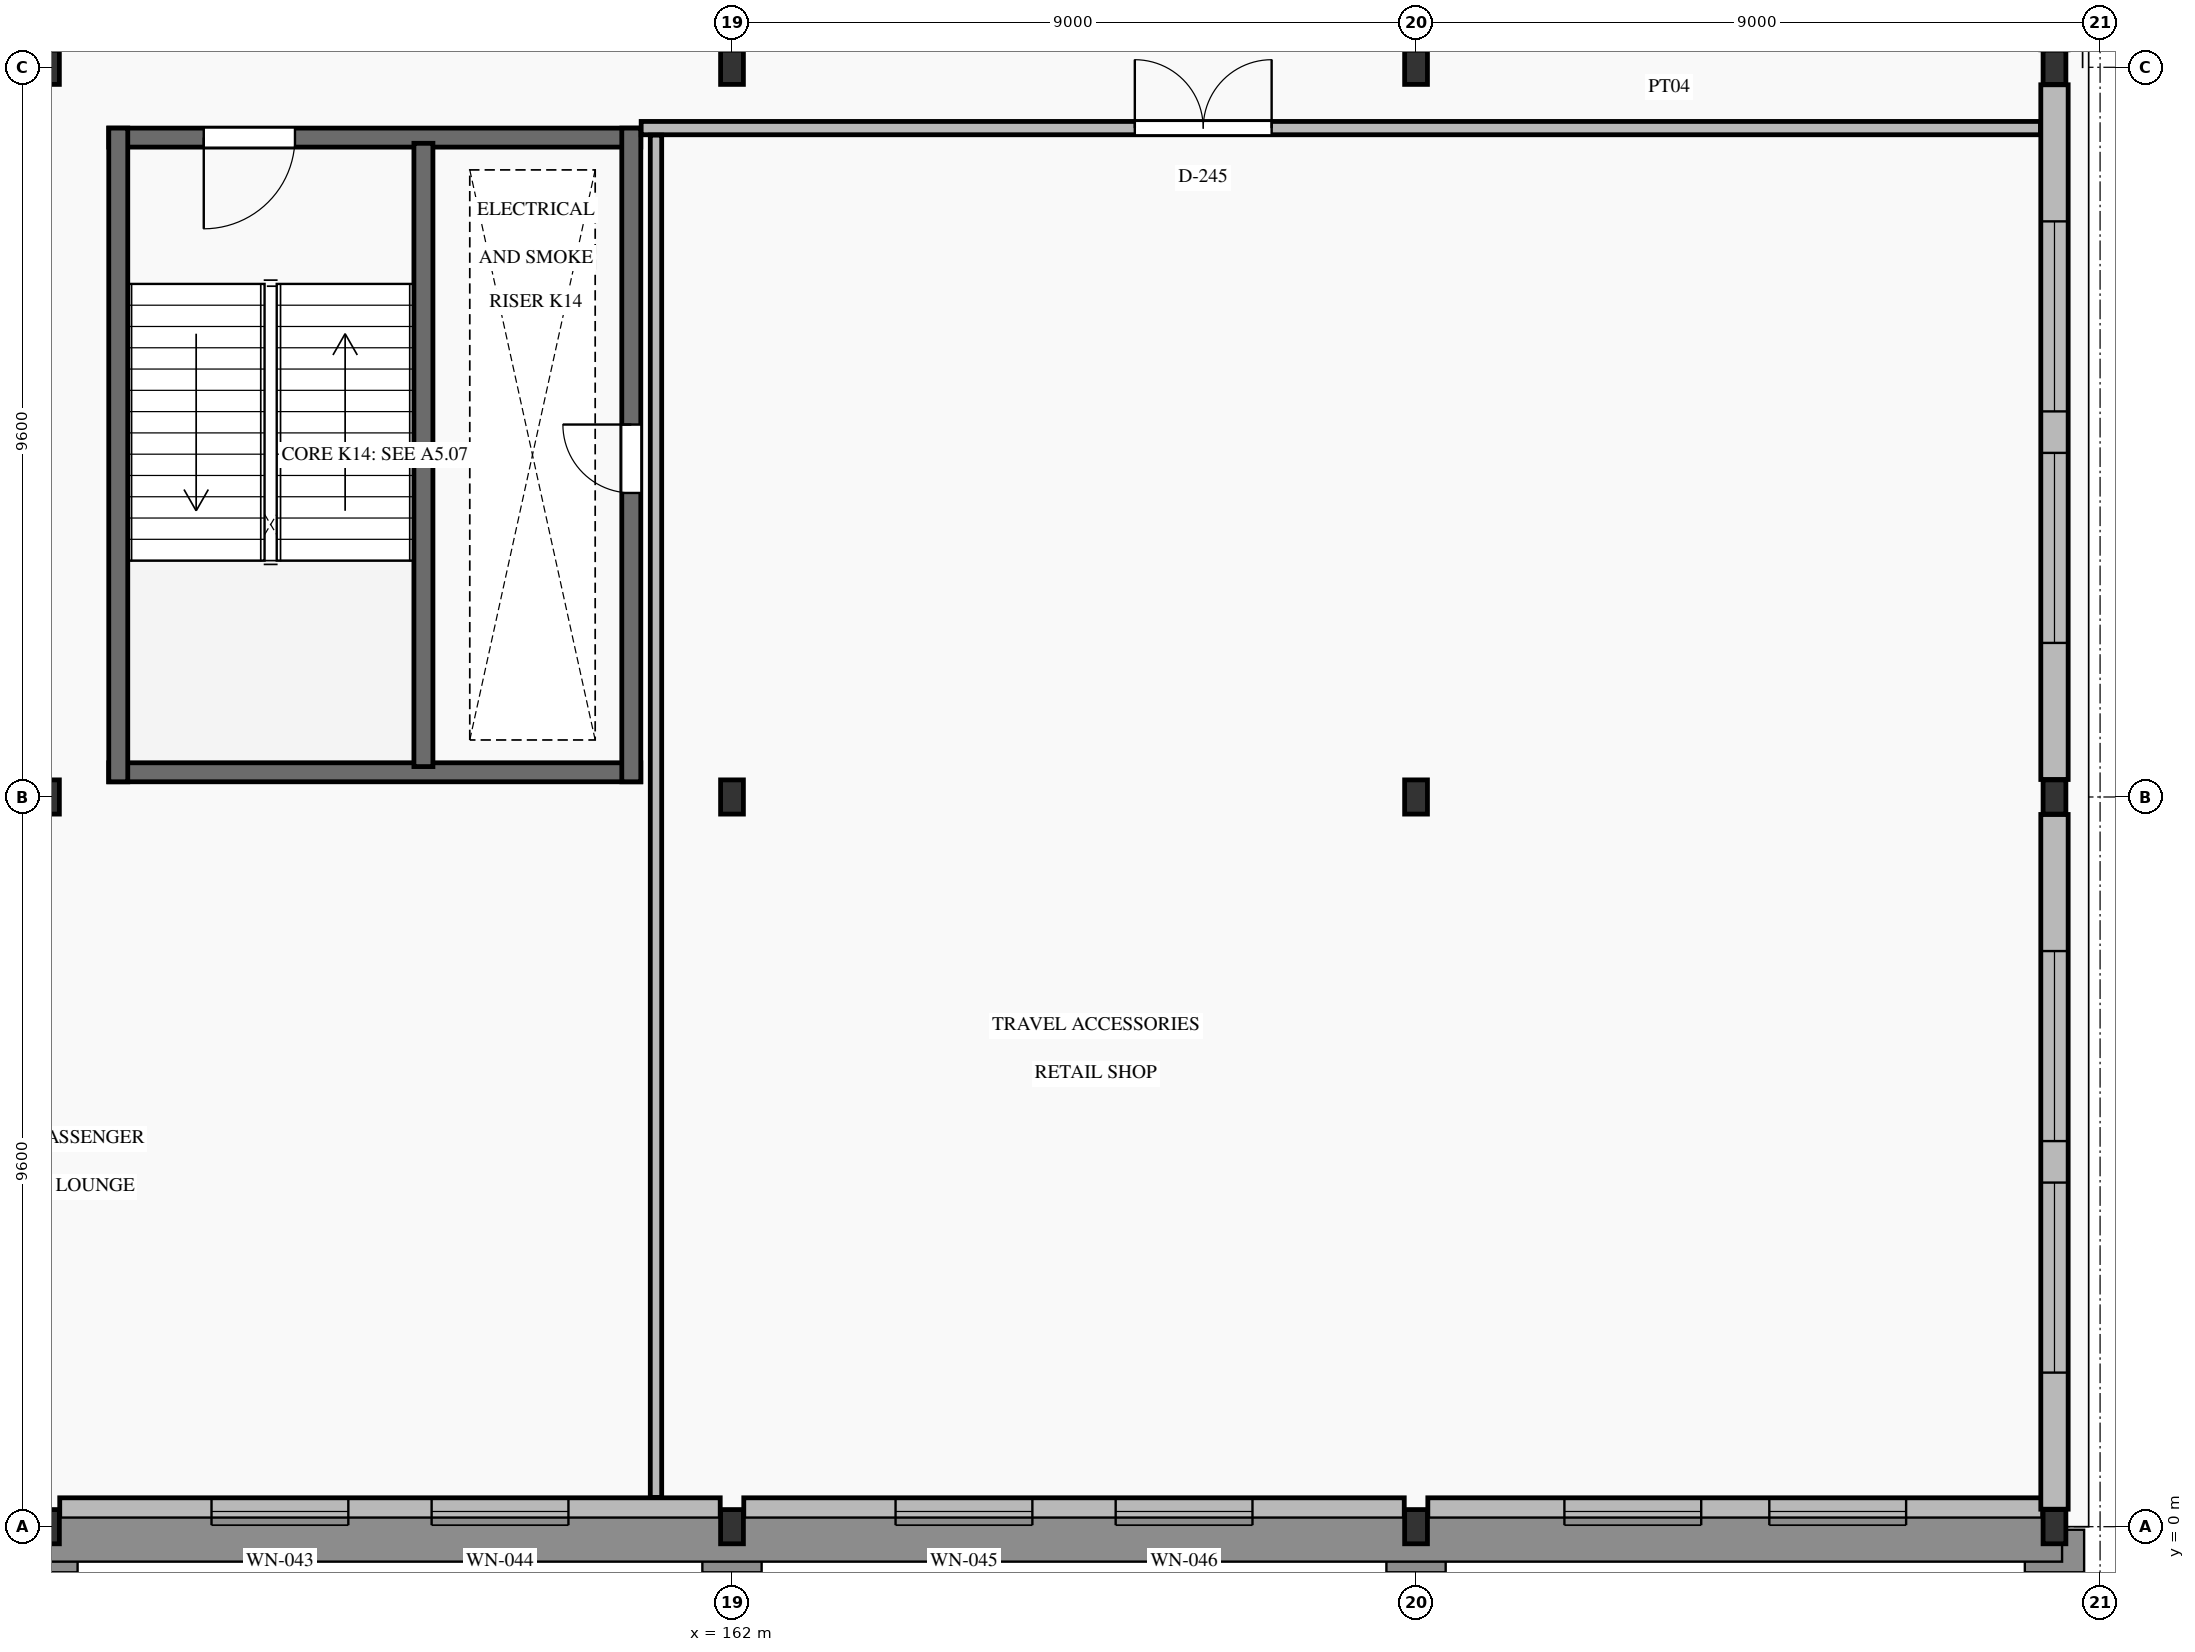
"""IFC4 building model, lengths in metres.
Left out: names, types, materials, properties, quantities, classifications, styles, units other than length and angle.
Written with IfcOpenShell. Run it as: python <this file> out.ifc"""

import sys

from ifc_helpers import new_model, si_unit, direction, frame, frame_2d, origin, origin_2d, place, context, subcontext, project, spatial, rectangle, i_section, extrude, element, fill, save


model = new_model("IFC4")
c1 = context("Model", 3, precision=1e-05, world=origin(), true_north=direction((0.0, 1.0)))
c2 = subcontext(c1, "Body", "Model", "MODEL_VIEW")
j1 = project(units=[si_unit("LENGTHUNIT", "METRE"), si_unit("PLANEANGLEUNIT", "RADIAN")], contexts=[c1])
p1 = place(None, origin())
s1 = spatial("IfcSite", under=j1, at=p1, CompositionType="ELEMENT")
p2 = place(p1, origin())
s2 = spatial("IfcBuilding", under=s1, at=p2, CompositionType="ELEMENT")
p3 = place(p2, frame((0.0, 0.0, 6.0)))
s3 = spatial("IfcBuildingStorey", under=s2, at=p3, CompositionType="ELEMENT", Elevation=6.0)
for number, where, z_axis, x_axis in (
    (1, (153.0, 0.0, 0.0), (0.0, 0.0, 1.0), (1.0, 0.0, 0.0)),
    (2, (153.0, 9.6, 0.0), (0.0, 0.0, 1.0), (1.0, 0.0, 0.0)),
    (3, (153.0, 19.2, 0.0), (0.0, 0.0, 1.0), (1.0, 0.0, 0.0)),
    (4, (162.0, 0.0, 0.0), (0.0, 0.0, 1.0), (1.0, 0.0, 0.0)),
    (5, (162.0, 9.6, 0.0), (0.0, 0.0, 1.0), (1.0, 0.0, 0.0)),
    (6, (162.0, 19.2, 0.0), (0.0, 0.0, 1.0), (1.0, 0.0, 0.0)),
    (7, (171.0, 0.0, 0.0), (0.0, 0.0, 1.0), (1.0, 0.0, 0.0)),
    (8, (171.0, 9.6, 0.0), (0.0, 0.0, 1.0), (1.0, 0.0, 0.0)),
    (9, (171.0, 19.2, 0.0), (0.0, 0.0, 1.0), (1.0, 0.0, 0.0)),
    (10, (179.4, 0.0, 0.0), (0.0, 0.0, 1.0), (1.0, 0.0, 0.0)),
    (11, (179.4, 9.6, 0.0), (0.0, 0.0, 1.0), (1.0, 0.0, 0.0)),
    (12, (179.4, 19.2, 0.0), (0.0, 0.0, 1.0), (1.0, 0.0, 0.0)),
):
    element("IfcColumn", number, at=place(p3, frame(where, z_axis=z_axis, x_axis=x_axis)), inside=s3, PredefinedType="COLUMN", context=c2, shape_type="SweptSolid", body=[
        extrude(i_section(OverallWidth=0.3, OverallDepth=0.45, WebThickness=0.014, FlangeThickness=0.026, FilletRadius=0.027, at=origin_2d()), origin(), (0.0, 0.0, 1.0), 4.8),
    ])
p4 = place(p3, frame((153.155, 0.2, 0.0), z_axis=(0.0, 0.0, 1.0), x_axis=(1.0, 0.0, 0.0)))
e13 = element("IfcWall", 13, at=p4, inside=s3, PredefinedType="SOLIDWALL", context=c2, shape_type="SweptSolid", body=[
    extrude(rectangle(XDim=8.69, YDim=0.36, at=frame_2d((4.345, 0.0))), origin(), (0.0, 0.0, 1.0), 4.23),
])
p5 = place(p4, frame((1.997, 0.0, 0.95)))
e14 = element("IfcOpeningElement", 14, at=p5, cuts=e13, PredefinedType="OPENING", context=c2, shape_type="SweptSolid", body=[
    extrude(rectangle(XDim=1.8, YDim=2.2, at=frame_2d((0.9, 1.1))), frame((0.0, 0.195, 0.0), z_axis=(0.0, -1.0, 0.0), x_axis=(1.0, 0.0, 0.0)), (0.0, 0.0, 1.0), 0.39),
])
p6 = place(p4, frame((4.893, 0.0, 0.95)))
e15 = element("IfcOpeningElement", 15, at=p6, cuts=e13, PredefinedType="OPENING", context=c2, shape_type="SweptSolid", body=[
    extrude(rectangle(XDim=1.8, YDim=2.2, at=frame_2d((0.9, 1.1))), frame((0.0, 0.195, 0.0), z_axis=(0.0, -1.0, 0.0), x_axis=(1.0, 0.0, 0.0)), (0.0, 0.0, 1.0), 0.39),
])
p7 = place(p3, frame((162.155, 0.2, 0.0), z_axis=(0.0, 0.0, 1.0), x_axis=(1.0, 0.0, 0.0)))
e16 = element("IfcWall", 16, at=p7, inside=s3, PredefinedType="SOLIDWALL", context=c2, shape_type="SweptSolid", body=[
    extrude(rectangle(XDim=8.69, YDim=0.36, at=frame_2d((4.345, 0.0))), origin(), (0.0, 0.0, 1.0), 4.215),
])
p8 = place(p7, frame((1.997, 0.0, 0.95)))
e17 = element("IfcOpeningElement", 17, at=p8, cuts=e16, PredefinedType="OPENING", context=c2, shape_type="SweptSolid", body=[
    extrude(rectangle(XDim=1.8, YDim=2.2, at=frame_2d((0.9, 1.1))), frame((0.0, 0.195, 0.0), z_axis=(0.0, -1.0, 0.0), x_axis=(1.0, 0.0, 0.0)), (0.0, 0.0, 1.0), 0.39),
])
p9 = place(p7, frame((4.893, 0.0, 0.95)))
e18 = element("IfcOpeningElement", 18, at=p9, cuts=e16, PredefinedType="OPENING", context=c2, shape_type="SweptSolid", body=[
    extrude(rectangle(XDim=1.8, YDim=2.2, at=frame_2d((0.9, 1.1))), frame((0.0, 0.195, 0.0), z_axis=(0.0, -1.0, 0.0), x_axis=(1.0, 0.0, 0.0)), (0.0, 0.0, 1.0), 0.39),
])
p10 = place(p3, frame((171.155, 0.2, 0.0), z_axis=(0.0, 0.0, 1.0), x_axis=(1.0, 0.0, 0.0)))
e19 = element("IfcWall", 19, at=p10, inside=s3, PredefinedType="SOLIDWALL", context=c2, shape_type="SweptSolid", body=[
    extrude(rectangle(XDim=8.09, YDim=0.36, at=frame_2d((4.045, 0.0))), origin(), (0.0, 0.0, 1.0), 4.215),
])
p11 = place(p10, frame((1.797, 0.0, 0.95)))
e20 = element("IfcOpeningElement", 20, at=p11, cuts=e19, PredefinedType="OPENING", context=c2, shape_type="SweptSolid", body=[
    extrude(rectangle(XDim=1.8, YDim=2.2, at=frame_2d((0.9, 1.1))), frame((0.0, 0.195, 0.0), z_axis=(0.0, -1.0, 0.0), x_axis=(1.0, 0.0, 0.0)), (0.0, 0.0, 1.0), 0.39),
])
p12 = place(p10, frame((4.493, 0.0, 0.95)))
e21 = element("IfcOpeningElement", 21, at=p12, cuts=e19, PredefinedType="OPENING", context=c2, shape_type="SweptSolid", body=[
    extrude(rectangle(XDim=1.8, YDim=2.2, at=frame_2d((0.9, 1.1))), frame((0.0, 0.195, 0.0), z_axis=(0.0, -1.0, 0.0), x_axis=(1.0, 0.0, 0.0)), (0.0, 0.0, 1.0), 0.39),
])
p13 = place(p3, frame((179.4, 0.23, 0.0), z_axis=(0.0, 0.0, 1.0), x_axis=(0.0, 1.0, 0.0)))
e22 = element("IfcWall", 22, at=p13, inside=s3, PredefinedType="SOLIDWALL", context=c2, shape_type="SweptSolid", body=[
    extrude(rectangle(XDim=9.14, YDim=0.36, at=frame_2d((4.57, 0.0))), origin(), (0.0, 0.0, 1.0), 4.185),
])
p14 = place(p13, frame((1.797, 0.0, 0.95)))
e23 = element("IfcOpeningElement", 23, at=p14, cuts=e22, PredefinedType="OPENING", context=c2, shape_type="SweptSolid", body=[
    extrude(rectangle(XDim=2.5, YDim=2.7, at=frame_2d((1.25, 1.35))), frame((0.0, 0.195, 0.0), z_axis=(0.0, -1.0, 0.0), x_axis=(1.0, 0.0, 0.0)), (0.0, 0.0, 1.0), 0.39),
])
p15 = place(p13, frame((4.843, 0.0, 0.95)))
e24 = element("IfcOpeningElement", 24, at=p15, cuts=e22, PredefinedType="OPENING", context=c2, shape_type="SweptSolid", body=[
    extrude(rectangle(XDim=2.5, YDim=2.7, at=frame_2d((1.25, 1.35))), frame((0.0, 0.195, 0.0), z_axis=(0.0, -1.0, 0.0), x_axis=(1.0, 0.0, 0.0)), (0.0, 0.0, 1.0), 0.39),
])
p16 = place(p3, frame((179.4, 9.83, 0.0), z_axis=(0.0, 0.0, 1.0), x_axis=(0.0, 1.0, 0.0)))
e25 = element("IfcWall", 25, at=p16, inside=s3, PredefinedType="SOLIDWALL", context=c2, shape_type="SweptSolid", body=[
    extrude(rectangle(XDim=9.14, YDim=0.36, at=frame_2d((4.57, 0.0))), origin(), (0.0, 0.0, 1.0), 4.185),
])
p17 = place(p16, frame((1.797, 0.0, 0.95)))
e26 = element("IfcOpeningElement", 26, at=p17, cuts=e25, PredefinedType="OPENING", context=c2, shape_type="SweptSolid", body=[
    extrude(rectangle(XDim=2.5, YDim=2.7, at=frame_2d((1.25, 1.35))), frame((0.0, 0.195, 0.0), z_axis=(0.0, -1.0, 0.0), x_axis=(1.0, 0.0, 0.0)), (0.0, 0.0, 1.0), 0.39),
])
p18 = place(p16, frame((4.843, 0.0, 0.95)))
e27 = element("IfcOpeningElement", 27, at=p18, cuts=e25, PredefinedType="OPENING", context=c2, shape_type="SweptSolid", body=[
    extrude(rectangle(XDim=2.5, YDim=2.7, at=frame_2d((1.25, 1.35))), frame((0.0, 0.195, 0.0), z_axis=(0.0, -1.0, 0.0), x_axis=(1.0, 0.0, 0.0)), (0.0, 0.0, 1.0), 0.39),
])
p19 = place(p3, frame((153.8, 9.925, 0.0), z_axis=(0.0, 0.0, 1.0), x_axis=(1.0, 0.0, 0.0)))
e28 = element("IfcWall", 28, at=p19, inside=s3, PredefinedType="SHEAR", context=c2, shape_type="SweptSolid", body=[
    extrude(rectangle(XDim=7.0, YDim=0.25, at=frame_2d((3.5, 0.0))), origin(), (0.0, 0.0, 1.0), 4.8),
])
p20 = place(p3, frame((153.8, 18.275, 0.0), z_axis=(0.0, 0.0, 1.0), x_axis=(1.0, 0.0, 0.0)))
e29 = element("IfcWall", 29, at=p20, inside=s3, PredefinedType="SHEAR", context=c2, shape_type="SweptSolid", body=[
    extrude(rectangle(XDim=7.0, YDim=0.25, at=frame_2d((3.5, 0.0))), origin(), (0.0, 0.0, 1.0), 4.8),
])
p21 = place(p20, frame((1.25, 0.0, 0.0)))
e30 = element("IfcOpeningElement", 30, at=p21, cuts=e29, PredefinedType="OPENING", context=c2, shape_type="SweptSolid", body=[
    extrude(rectangle(XDim=1.2, YDim=2.15, at=frame_2d((0.6, 1.075))), frame((0.0, 0.14, 0.0), z_axis=(0.0, -1.0, 0.0), x_axis=(1.0, 0.0, 0.0)), (0.0, 0.0, 1.0), 0.28),
])
p22 = place(p3, frame((153.925, 9.8, 0.0), z_axis=(0.0, 0.0, 1.0), x_axis=(0.0, 1.0, 0.0)))
e31 = element("IfcWall", 31, at=p22, inside=s3, PredefinedType="SHEAR", context=c2, shape_type="SweptSolid", body=[
    extrude(rectangle(XDim=8.6, YDim=0.25, at=frame_2d((4.3, 0.0))), origin(), (0.0, 0.0, 1.0), 4.8),
])
p23 = place(p3, frame((160.675, 9.8, 0.0), z_axis=(0.0, 0.0, 1.0), x_axis=(0.0, 1.0, 0.0)))
e32 = element("IfcWall", 32, at=p23, inside=s3, PredefinedType="SHEAR", context=c2, shape_type="SweptSolid", body=[
    extrude(rectangle(XDim=8.6, YDim=0.25, at=frame_2d((4.3, 0.0))), origin(), (0.0, 0.0, 1.0), 4.8),
])
p24 = place(p23, frame((3.8, 0.0, 0.0)))
e33 = element("IfcOpeningElement", 33, at=p24, cuts=e32, PredefinedType="OPENING", context=c2, shape_type="SweptSolid", body=[
    extrude(rectangle(XDim=0.9, YDim=2.05, at=frame_2d((0.45, 1.025))), frame((0.0, 0.14, 0.0), z_axis=(0.0, -1.0, 0.0), x_axis=(1.0, 0.0, 0.0)), (0.0, 0.0, 1.0), 0.28),
])
p25 = place(p3, frame((157.94, 10.0, 0.0), z_axis=(0.0, 0.0, 1.0), x_axis=(0.0, 1.0, 0.0)))
e34 = element("IfcWall", 34, at=p25, inside=s3, PredefinedType="SHEAR", context=c2, shape_type="SweptSolid", body=[
    extrude(rectangle(XDim=8.2, YDim=0.25, at=frame_2d((4.1, 0.0))), origin(), (0.0, 0.0, 1.0), 4.8),
])
p26 = place(p3, frame((160.805, 18.4, 0.0), z_axis=(0.0, 0.0, 1.0), x_axis=(1.0, 0.0, 0.0)))
e35 = element("IfcWall", 35, at=p26, inside=s3, PredefinedType="PARTITIONING", context=c2, shape_type="SweptSolid", body=[
    extrude(rectangle(XDim=18.41, YDim=0.175, at=frame_2d((9.205, 0.0))), origin(), (0.0, 0.0, 1.0), 4.53),
])
p27 = place(p26, frame((6.495, 0.0, 0.0)))
e36 = element("IfcOpeningElement", 36, at=p27, cuts=e35, PredefinedType="OPENING", context=c2, shape_type="SweptSolid", body=[
    extrude(rectangle(XDim=1.8, YDim=2.3, at=frame_2d((0.9, 1.15))), frame((0.0, 0.103, 0.0), z_axis=(0.0, -1.0, 0.0), x_axis=(1.0, 0.0, 0.0)), (0.0, 0.0, 1.0), 0.205),
])
p28 = place(p3, frame((161.0, 0.385, 0.0), z_axis=(0.0, 0.0, 1.0), x_axis=(0.0, 1.0, 0.0)))
e37 = element("IfcWall", 37, at=p28, inside=s3, PredefinedType="PARTITIONING", context=c2, shape_type="SweptSolid", body=[
    extrude(rectangle(XDim=17.923, YDim=0.15, at=frame_2d((8.961, 0.0))), origin(), (0.0, 0.0, 1.0), 4.53),
])
p29 = place(p5, origin())
e38 = element("IfcWindow", 38, at=p29, inside=s3, PartitioningType="SINGLE_PANEL", PredefinedType="WINDOW", context=c2, shape_type="SweptSolid", body=[
    extrude(rectangle(XDim=1.8, YDim=2.2, at=frame_2d((0.9, 1.1))), frame((0.0, 0.03, 0.0), z_axis=(0.0, -1.0, 0.0), x_axis=(1.0, 0.0, 0.0)), (0.0, 0.0, 1.0), 0.06),
])
fill(e14, e38)
p30 = place(p6, origin())
e39 = element("IfcWindow", 39, at=p30, inside=s3, PartitioningType="SINGLE_PANEL", PredefinedType="WINDOW", context=c2, shape_type="SweptSolid", body=[
    extrude(rectangle(XDim=1.8, YDim=2.2, at=frame_2d((0.9, 1.1))), frame((0.0, 0.03, 0.0), z_axis=(0.0, -1.0, 0.0), x_axis=(1.0, 0.0, 0.0)), (0.0, 0.0, 1.0), 0.06),
])
fill(e15, e39)
p31 = place(p8, origin())
e40 = element("IfcWindow", 40, at=p31, inside=s3, PartitioningType="SINGLE_PANEL", PredefinedType="WINDOW", context=c2, shape_type="SweptSolid", body=[
    extrude(rectangle(XDim=1.8, YDim=2.2, at=frame_2d((0.9, 1.1))), frame((0.0, 0.03, 0.0), z_axis=(0.0, -1.0, 0.0), x_axis=(1.0, 0.0, 0.0)), (0.0, 0.0, 1.0), 0.06),
])
fill(e17, e40)
p32 = place(p9, origin())
e41 = element("IfcWindow", 41, at=p32, inside=s3, PartitioningType="SINGLE_PANEL", PredefinedType="WINDOW", context=c2, shape_type="SweptSolid", body=[
    extrude(rectangle(XDim=1.8, YDim=2.2, at=frame_2d((0.9, 1.1))), frame((0.0, 0.03, 0.0), z_axis=(0.0, -1.0, 0.0), x_axis=(1.0, 0.0, 0.0)), (0.0, 0.0, 1.0), 0.06),
])
fill(e18, e41)
p33 = place(p11, origin())
e42 = element("IfcWindow", 42, at=p33, inside=s3, PartitioningType="SINGLE_PANEL", PredefinedType="WINDOW", context=c2, shape_type="SweptSolid", body=[
    extrude(rectangle(XDim=1.8, YDim=2.2, at=frame_2d((0.9, 1.1))), frame((0.0, 0.03, 0.0), z_axis=(0.0, -1.0, 0.0), x_axis=(1.0, 0.0, 0.0)), (0.0, 0.0, 1.0), 0.06),
])
fill(e20, e42)
p34 = place(p12, origin())
e43 = element("IfcWindow", 43, at=p34, inside=s3, PartitioningType="SINGLE_PANEL", PredefinedType="WINDOW", context=c2, shape_type="SweptSolid", body=[
    extrude(rectangle(XDim=1.8, YDim=2.2, at=frame_2d((0.9, 1.1))), frame((0.0, 0.03, 0.0), z_axis=(0.0, -1.0, 0.0), x_axis=(1.0, 0.0, 0.0)), (0.0, 0.0, 1.0), 0.06),
])
fill(e21, e43)
p35 = place(p14, origin())
e44 = element("IfcWindow", 44, at=p35, inside=s3, PartitioningType="SINGLE_PANEL", PredefinedType="WINDOW", context=c2, shape_type="SweptSolid", body=[
    extrude(rectangle(XDim=2.5, YDim=2.7, at=frame_2d((1.25, 1.35))), frame((0.0, 0.03, 0.0), z_axis=(0.0, -1.0, 0.0), x_axis=(1.0, 0.0, 0.0)), (0.0, 0.0, 1.0), 0.06),
])
fill(e23, e44)
p36 = place(p15, origin())
e45 = element("IfcWindow", 45, at=p36, inside=s3, PartitioningType="SINGLE_PANEL", PredefinedType="WINDOW", context=c2, shape_type="SweptSolid", body=[
    extrude(rectangle(XDim=2.5, YDim=2.7, at=frame_2d((1.25, 1.35))), frame((0.0, 0.03, 0.0), z_axis=(0.0, -1.0, 0.0), x_axis=(1.0, 0.0, 0.0)), (0.0, 0.0, 1.0), 0.06),
])
fill(e24, e45)
p37 = place(p17, origin())
e46 = element("IfcWindow", 46, at=p37, inside=s3, PartitioningType="SINGLE_PANEL", PredefinedType="WINDOW", context=c2, shape_type="SweptSolid", body=[
    extrude(rectangle(XDim=2.5, YDim=2.7, at=frame_2d((1.25, 1.35))), frame((0.0, 0.03, 0.0), z_axis=(0.0, -1.0, 0.0), x_axis=(1.0, 0.0, 0.0)), (0.0, 0.0, 1.0), 0.06),
])
fill(e26, e46)
p38 = place(p18, origin())
e47 = element("IfcWindow", 47, at=p38, inside=s3, PartitioningType="SINGLE_PANEL", PredefinedType="WINDOW", context=c2, shape_type="SweptSolid", body=[
    extrude(rectangle(XDim=2.5, YDim=2.7, at=frame_2d((1.25, 1.35))), frame((0.0, 0.03, 0.0), z_axis=(0.0, -1.0, 0.0), x_axis=(1.0, 0.0, 0.0)), (0.0, 0.0, 1.0), 0.06),
])
fill(e27, e47)
p39 = place(p21, frame((1.2, 0.0, 0.0), z_axis=(0.0, 0.0, 1.0), x_axis=(-1.0, 0.0, 0.0)))
e48 = element("IfcDoor", 48, at=p39, inside=s3, OperationType="SINGLE_SWING_LEFT", PredefinedType="DOOR", context=c2, shape_type="SweptSolid", body=[
    extrude(rectangle(XDim=1.2, YDim=2.15, at=frame_2d((0.6, 1.075))), frame((0.0, 0.025, 0.0), z_axis=(0.0, -1.0, 0.0), x_axis=(1.0, 0.0, 0.0)), (0.0, 0.0, 1.0), 0.05),
])
fill(e30, e48)
p40 = place(p24, origin())
e49 = element("IfcDoor", 49, at=p40, inside=s3, OperationType="SINGLE_SWING_RIGHT", PredefinedType="DOOR", context=c2, shape_type="SweptSolid", body=[
    extrude(rectangle(XDim=0.9, YDim=2.05, at=frame_2d((0.45, 1.025))), frame((0.0, 0.025, 0.0), z_axis=(0.0, -1.0, 0.0), x_axis=(1.0, 0.0, 0.0)), (0.0, 0.0, 1.0), 0.05),
])
fill(e33, e49)
p41 = place(p27, origin())
e50 = element("IfcDoor", 50, at=p41, inside=s3, OperationType="DOUBLE_DOOR_SINGLE_SWING", PredefinedType="DOOR", context=c2, shape_type="SweptSolid", body=[
    extrude(rectangle(XDim=1.8, YDim=2.3, at=frame_2d((0.9, 1.15))), frame((0.0, 0.025, 0.0), z_axis=(0.0, -1.0, 0.0), x_axis=(1.0, 0.0, 0.0)), (0.0, 0.0, 1.0), 0.05),
])
fill(e36, e50)
save(model, sys.argv[1])
